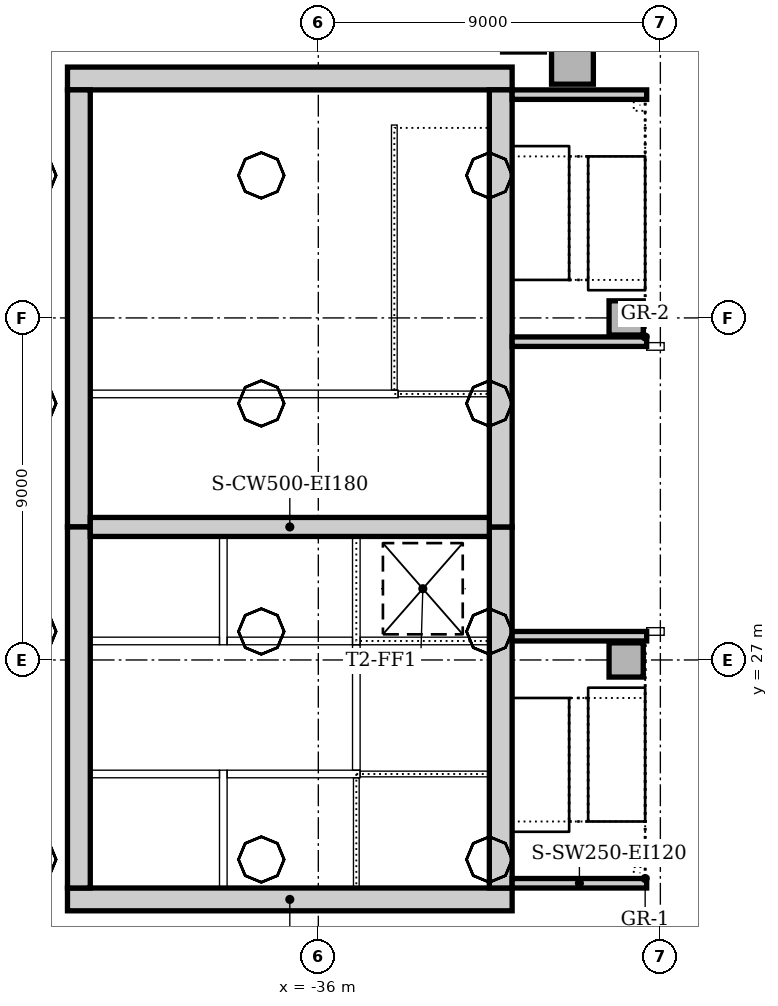
"""IFC4 building model, lengths in metres.
Left out: names, types, materials, properties, quantities, classifications, styles, units other than length and angle.
Written with IfcOpenShell. Run it as: python <this file> out.ifc"""

import sys

from ifc_helpers import new_model, si_unit, direction, frame, frame_2d, origin, origin_2d, place, context, subcontext, project, spatial, rectangle, extrude, element, fill, save


model = new_model("IFC4")
c1 = context("Model", 3, precision=1e-05, world=origin(), true_north=direction((0.0, 1.0)))
c2 = subcontext(c1, "Body", "Model", "MODEL_VIEW")
j1 = project(units=[si_unit("LENGTHUNIT", "METRE"), si_unit("PLANEANGLEUNIT", "RADIAN")], contexts=[c1])
p1 = place(None, origin())
s1 = spatial("IfcSite", under=j1, at=p1, CompositionType="ELEMENT")
p2 = place(p1, origin())
s2 = spatial("IfcBuilding", under=s1, at=p2, CompositionType="ELEMENT")
p3 = place(p2, frame((0.0, 0.0, -14.0)))
s3 = spatial("IfcBuildingStorey", under=s2, at=p3, CompositionType="ELEMENT", Elevation=-14.0)
for number, where, z_axis, x_axis in (
    (1, (-42.6, 20.7, 0.0), (0.0, 0.0, 1.0), (1.0, 0.0, 0.0)),
    (2, (-30.9, 42.3, 0.0), (0.0, 0.0, 1.0), (-1.0, 0.0, 0.0)),
):
    element("IfcWall", number, at=place(p3, frame(where, z_axis=z_axis, x_axis=x_axis)), inside=s3, PredefinedType="SOLIDWALL", context=c2, shape_type="SweptSolid", body=[
        extrude(rectangle(XDim=11.7, YDim=0.6, at=frame_2d((5.85, 0.0))), origin(), (0.0, 0.0, 1.0), 4.5),
    ])
p4 = place(p3, frame((-31.2, 21.0, 0.0), z_axis=(0.0, 0.0, 1.0), x_axis=(0.0, 1.0, 0.0)))
e3 = element("IfcWall", 3, at=p4, inside=s3, PredefinedType="SOLIDWALL", context=c2, shape_type="SweptSolid", body=[
    extrude(rectangle(XDim=9.5, YDim=0.6, at=frame_2d((4.75, 0.0))), origin(), (0.0, 0.0, 1.0), 4.5),
])
p5 = place(p4, frame((5.25, 0.0, 0.0)))
e4 = element("IfcOpeningElement", 4, at=p5, cuts=e3, PredefinedType="OPENING", context=c2, shape_type="SweptSolid", body=[
    extrude(rectangle(XDim=1.0, YDim=2.1, at=frame_2d((0.5, 1.05))), frame((0.0, 0.31, 0.0), z_axis=(0.0, -1.0, 0.0), x_axis=(1.0, 0.0, 0.0)), (0.0, 0.0, 1.0), 0.62),
])
p6 = place(p3, frame((-31.2, 30.5, 0.0), z_axis=(0.0, 0.0, 1.0), x_axis=(0.0, 1.0, 0.0)))
e5 = element("IfcWall", 5, at=p6, inside=s3, PredefinedType="SOLIDWALL", context=c2, shape_type="SweptSolid", body=[
    extrude(rectangle(XDim=11.5, YDim=0.6, at=frame_2d((5.75, 0.0))), origin(), (0.0, 0.0, 1.0), 4.5),
])
p7 = place(p6, frame((0.85, 0.0, 0.0)))
e6 = element("IfcOpeningElement", 6, at=p7, cuts=e5, PredefinedType="OPENING", context=c2, shape_type="SweptSolid", body=[
    extrude(rectangle(XDim=1.8, YDim=2.1, at=frame_2d((0.9, 1.05))), frame((0.0, 0.31, 0.0), z_axis=(0.0, -1.0, 0.0), x_axis=(1.0, 0.0, 0.0)), (0.0, 0.0, 1.0), 0.62),
])
p8 = place(p3, frame((-42.3, 42.0, 0.0), z_axis=(0.0, 0.0, 1.0), x_axis=(0.0, -1.0, 0.0)))
e7 = element("IfcWall", 7, at=p8, inside=s3, PredefinedType="SOLIDWALL", context=c2, shape_type="SweptSolid", body=[
    extrude(rectangle(XDim=11.5, YDim=0.6, at=frame_2d((5.75, 0.0))), origin(), (0.0, 0.0, 1.0), 4.5),
])
p9 = place(p8, frame((8.85, 0.0, 0.0)))
e8 = element("IfcOpeningElement", 8, at=p9, cuts=e7, PredefinedType="OPENING", context=c2, shape_type="SweptSolid", body=[
    extrude(rectangle(XDim=1.8, YDim=2.1, at=frame_2d((0.9, 1.05))), frame((0.0, 0.31, 0.0), z_axis=(0.0, -1.0, 0.0), x_axis=(1.0, 0.0, 0.0)), (0.0, 0.0, 1.0), 0.62),
])
p10 = place(p3, frame((-42.3, 30.5, 0.0), z_axis=(0.0, 0.0, 1.0), x_axis=(0.0, -1.0, 0.0)))
e9 = element("IfcWall", 9, at=p10, inside=s3, PredefinedType="SOLIDWALL", context=c2, shape_type="SweptSolid", body=[
    extrude(rectangle(XDim=9.5, YDim=0.6, at=frame_2d((4.75, 0.0))), origin(), (0.0, 0.0, 1.0), 4.5),
])
p11 = place(p3, frame((-42.0, 30.5, 0.0), z_axis=(0.0, 0.0, 1.0), x_axis=(1.0, 0.0, 0.0)))
e10 = element("IfcWall", 10, at=p11, inside=s3, PredefinedType="SOLIDWALL", context=c2, shape_type="SweptSolid", body=[
    extrude(rectangle(XDim=10.5, YDim=0.5, at=frame_2d((5.25, 0.0))), origin(), (0.0, 0.0, 1.0), 4.5),
])
p12 = place(p3, frame((-30.9, 21.125, 0.0), z_axis=(0.0, 0.0, 1.0), x_axis=(1.0, 0.0, 0.0)))
e11 = element("IfcWall", 11, at=p12, inside=s3, PredefinedType="SOLIDWALL", context=c2, shape_type="SweptSolid", body=[
    extrude(rectangle(XDim=3.54, YDim=0.25, at=frame_2d((1.77, 0.0))), origin(), (0.0, 0.0, 1.0), 4.5),
])
p13 = place(p3, frame((-27.36, 27.625, 0.0), z_axis=(0.0, 0.0, 1.0), x_axis=(-1.0, 0.0, 0.0)))
e12 = element("IfcWall", 12, at=p13, inside=s3, PredefinedType="SOLIDWALL", context=c2, shape_type="SweptSolid", body=[
    extrude(rectangle(XDim=3.54, YDim=0.25, at=frame_2d((1.77, 0.0))), origin(), (0.0, 0.0, 1.0), 4.5),
])
p14 = place(p13, frame((1.69, 0.0, 0.0)))
e13 = element("IfcOpeningElement", 13, at=p14, cuts=e12, PredefinedType="OPENING", context=c2, shape_type="SweptSolid", body=[
    extrude(rectangle(XDim=1.1, YDim=2.1, at=frame_2d((0.55, 1.05))), frame((0.0, 0.135, 0.0), z_axis=(0.0, -1.0, 0.0), x_axis=(1.0, 0.0, 0.0)), (0.0, 0.0, 1.0), 0.27),
])
p15 = place(p3, frame((-30.9, 35.375, 0.0), z_axis=(0.0, 0.0, 1.0), x_axis=(1.0, 0.0, 0.0)))
e14 = element("IfcWall", 14, at=p15, inside=s3, PredefinedType="SOLIDWALL", context=c2, shape_type="SweptSolid", body=[
    extrude(rectangle(XDim=3.54, YDim=0.25, at=frame_2d((1.77, 0.0))), origin(), (0.0, 0.0, 1.0), 4.5),
])
p16 = place(p15, frame((0.75, 0.0, 0.0)))
e15 = element("IfcOpeningElement", 15, at=p16, cuts=e14, PredefinedType="OPENING", context=c2, shape_type="SweptSolid", body=[
    extrude(rectangle(XDim=1.1, YDim=2.1, at=frame_2d((0.55, 1.05))), frame((0.0, 0.135, 0.0), z_axis=(0.0, -1.0, 0.0), x_axis=(1.0, 0.0, 0.0)), (0.0, 0.0, 1.0), 0.27),
])
p17 = place(p3, frame((-27.36, 41.875, 0.0), z_axis=(0.0, 0.0, 1.0), x_axis=(-1.0, 0.0, 0.0)))
e16 = element("IfcWall", 16, at=p17, inside=s3, PredefinedType="SOLIDWALL", context=c2, shape_type="SweptSolid", body=[
    extrude(rectangle(XDim=3.54, YDim=0.25, at=frame_2d((1.77, 0.0))), origin(), (0.0, 0.0, 1.0), 4.5),
])
for number, where, z_axis, x_axis in (
    (17, (-29.313, 42.7, 0.0), (0.0, 0.0, 1.0), (1.0, 0.0, 0.0)),
    (18, (-30.602, 43.547, 0.0), (0.0, 0.0, 1.0), (1.0, 0.0, 0.0)),
):
    element("IfcColumn", number, at=place(p3, frame(where, z_axis=z_axis, x_axis=x_axis)), inside=s3, PredefinedType="COLUMN", context=c2, shape_type="SweptSolid", body=[
        extrude(rectangle(XDim=1.1, YDim=1.1, at=origin_2d()), origin(), (0.0, 0.0, 1.0), 4.15),
    ])
for number, where, z_axis, x_axis in (
    (19, (-27.9, 27.0, 0.0), (0.0, 0.0, 1.0), (1.0, 0.0, 0.0)),
    (20, (-27.9, 36.0, 0.0), (0.0, 0.0, 1.0), (1.0, 0.0, 0.0)),
):
    element("IfcColumn", number, at=place(p3, frame(where, z_axis=z_axis, x_axis=x_axis)), inside=s3, PredefinedType="COLUMN", context=c2, shape_type="SweptSolid", body=[
        extrude(rectangle(XDim=0.9, YDim=0.9, at=origin_2d()), origin(), (0.0, 0.0, 1.0), 4.5),
    ])
p18 = place(p3, frame((-38.5, 21.0, 0.0), z_axis=(0.0, 0.0, 1.0), x_axis=(0.0, 1.0, 0.0)))
e21 = element("IfcWall", 21, at=p18, inside=s3, PredefinedType="SOLIDWALL", context=c2, shape_type="SweptSolid", body=[
    extrude(rectangle(XDim=3.1, YDim=0.2, at=frame_2d((1.55, 0.0))), origin(), (0.0, 0.0, 1.0), 4.5),
])
p19 = place(p3, frame((-38.6, 24.0, 0.0), z_axis=(0.0, 0.0, 1.0), x_axis=(-1.0, 0.0, 0.0)))
e22 = element("IfcWall", 22, at=p19, inside=s3, PredefinedType="SOLIDWALL", context=c2, shape_type="SweptSolid", body=[
    extrude(rectangle(XDim=3.4, YDim=0.2, at=frame_2d((1.7, 0.0))), origin(), (0.0, 0.0, 1.0), 4.5),
])
p20 = place(p3, frame((-34.9, 24.0, 0.0), z_axis=(0.0, 0.0, 1.0), x_axis=(-1.0, 0.0, 0.0)))
e23 = element("IfcWall", 23, at=p20, inside=s3, PredefinedType="SOLIDWALL", context=c2, shape_type="SweptSolid", body=[
    extrude(rectangle(XDim=3.5, YDim=0.2, at=frame_2d((1.75, 0.0))), origin(), (0.0, 0.0, 1.0), 4.5),
])
p21 = place(p3, frame((-38.5, 27.4, 0.0), z_axis=(0.0, 0.0, 1.0), x_axis=(0.0, 1.0, 0.0)))
e24 = element("IfcWall", 24, at=p21, inside=s3, PredefinedType="SOLIDWALL", context=c2, shape_type="SweptSolid", body=[
    extrude(rectangle(XDim=2.85, YDim=0.2, at=frame_2d((1.425, 0.0))), origin(), (0.0, 0.0, 1.0), 4.5),
])
p22 = place(p3, frame((-42.0, 27.5, 0.0), z_axis=(0.0, 0.0, 1.0), x_axis=(1.0, 0.0, 0.0)))
e25 = element("IfcWall", 25, at=p22, inside=s3, PredefinedType="SOLIDWALL", context=c2, shape_type="SweptSolid", body=[
    extrude(rectangle(XDim=3.4, YDim=0.2, at=frame_2d((1.7, 0.0))), origin(), (0.0, 0.0, 1.0), 4.5),
])
p23 = place(p3, frame((-35.0, 27.4, 0.0), z_axis=(0.0, 0.0, 1.0), x_axis=(0.0, 1.0, 0.0)))
e26 = element("IfcWall", 26, at=p23, inside=s3, PredefinedType="SOLIDWALL", context=c2, shape_type="SweptSolid", body=[
    extrude(rectangle(XDim=2.85, YDim=0.2, at=frame_2d((1.425, 0.0))), origin(), (0.0, 0.0, 1.0), 4.5),
])
p24 = place(p3, frame((-38.4, 27.5, 0.0), z_axis=(0.0, 0.0, 1.0), x_axis=(1.0, 0.0, 0.0)))
e27 = element("IfcWall", 27, at=p24, inside=s3, PredefinedType="SOLIDWALL", context=c2, shape_type="SweptSolid", body=[
    extrude(rectangle(XDim=3.3, YDim=0.2, at=frame_2d((1.65, 0.0))), origin(), (0.0, 0.0, 1.0), 4.5),
])
p25 = place(p3, frame((-34.9, 27.5, 0.0), z_axis=(0.0, 0.0, 1.0), x_axis=(1.0, 0.0, 0.0)))
e28 = element("IfcWall", 28, at=p25, inside=s3, PredefinedType="SOLIDWALL", context=c2, shape_type="SweptSolid", body=[
    extrude(rectangle(XDim=3.4, YDim=0.2, at=frame_2d((1.7, 0.0))), origin(), (0.0, 0.0, 1.0), 4.5),
])
p26 = place(p25, frame((1.1, 0.0, 0.0)))
e29 = element("IfcOpeningElement", 29, at=p26, cuts=e28, PredefinedType="OPENING", context=c2, shape_type="SweptSolid", body=[
    extrude(rectangle(XDim=1.1, YDim=2.1, at=frame_2d((0.55, 1.05))), frame((0.0, 0.11, 0.0), z_axis=(0.0, -1.0, 0.0), x_axis=(1.0, 0.0, 0.0)), (0.0, 0.0, 1.0), 0.22),
])
p27 = place(p3, frame((-35.0, 24.1, 0.0), z_axis=(0.0, 0.0, 1.0), x_axis=(0.0, 1.0, 0.0)))
e30 = element("IfcWall", 30, at=p27, inside=s3, PredefinedType="SOLIDWALL", context=c2, shape_type="SweptSolid", body=[
    extrude(rectangle(XDim=3.3, YDim=0.2, at=frame_2d((1.65, 0.0))), origin(), (0.0, 0.0, 1.0), 4.5),
])
for number, where, z_axis, x_axis in (
    (31, (-27.36, 27.75, 0.0), (0.0, 0.0, 1.0), (1.0, 0.0, 0.0)),
    (32, (-26.9, 35.25, 0.0), (0.0, 0.0, 1.0), (-1.0, 0.0, 0.0)),
):
    element("IfcWall", number, at=place(p3, frame(where, z_axis=z_axis, x_axis=x_axis)), inside=s3, PredefinedType="SOLIDWALL", context=c2, shape_type="SweptSolid", body=[
        extrude(rectangle(XDim=0.46, YDim=0.2, at=frame_2d((0.23, 0.0))), origin(), (0.0, 0.0, 1.0), 4.5),
    ])
p28 = place(p3, frame((-33.9, 34.0, 0.0), z_axis=(0.0, 0.0, 1.0), x_axis=(-1.0, 0.0, 0.0)))
e33 = element("IfcWall", 33, at=p28, inside=s3, PredefinedType="SOLIDWALL", context=c2, shape_type="SweptSolid", body=[
    extrude(rectangle(XDim=8.1, YDim=0.2, at=frame_2d((4.05, 0.0))), origin(), (0.0, 0.0, 1.0), 4.5),
])
p29 = place(p3, frame((-35.0, 21.0, 0.0), z_axis=(0.0, 0.0, 1.0), x_axis=(0.0, 1.0, 0.0)))
e34 = element("IfcWall", 34, at=p29, inside=s3, PredefinedType="SOLIDWALL", context=c2, shape_type="SweptSolid", body=[
    extrude(rectangle(XDim=2.9, YDim=0.15, at=frame_2d((1.45, 0.0))), origin(), (0.0, 0.0, 1.0), 4.5),
])
p30 = place(p3, frame((-31.5, 24.0, 0.0), z_axis=(0.0, 0.0, 1.0), x_axis=(-1.0, 0.0, 0.0)))
e35 = element("IfcWall", 35, at=p30, inside=s3, PredefinedType="SOLIDWALL", context=c2, shape_type="SweptSolid", body=[
    extrude(rectangle(XDim=3.4, YDim=0.15, at=frame_2d((1.7, 0.0))), origin(), (0.0, 0.0, 1.0), 4.5),
])
p31 = place(p3, frame((-33.9, 34.0, 0.0), z_axis=(0.0, 0.0, 1.0), x_axis=(1.0, 0.0, 0.0)))
e36 = element("IfcWall", 36, at=p31, inside=s3, PredefinedType="SOLIDWALL", context=c2, shape_type="SweptSolid", body=[
    extrude(rectangle(XDim=2.4, YDim=0.15, at=frame_2d((1.2, 0.0))), origin(), (0.0, 0.0, 1.0), 4.5),
])
p32 = place(p3, frame((-34.0, 41.075, 0.0), z_axis=(0.0, 0.0, 1.0), x_axis=(0.0, -1.0, 0.0)))
e37 = element("IfcWall", 37, at=p32, inside=s3, PredefinedType="SOLIDWALL", context=c2, shape_type="SweptSolid", body=[
    extrude(rectangle(XDim=6.975, YDim=0.15, at=frame_2d((3.487, 0.0))), origin(), (0.0, 0.0, 1.0), 4.5),
])
p33 = place(p26, origin())
e38 = element("IfcDoor", 38, at=p33, inside=s3, OperationType="SLIDING_TO_LEFT", PredefinedType="DOOR", context=c2, shape_type="SweptSolid", body=[
    extrude(rectangle(XDim=1.1, YDim=2.1, at=frame_2d((0.55, 1.05))), frame((0.0, 0.025, 0.0), z_axis=(0.0, -1.0, 0.0), x_axis=(1.0, 0.0, 0.0)), (0.0, 0.0, 1.0), 0.05),
])
fill(e29, e38)
p34 = place(p5, frame((1.0, 0.0, 0.0), z_axis=(0.0, 0.0, 1.0), x_axis=(-1.0, 0.0, 0.0)))
e39 = element("IfcDoor", 39, at=p34, inside=s3, OperationType="SINGLE_SWING_LEFT", PredefinedType="DOOR", context=c2, shape_type="SweptSolid", body=[
    extrude(rectangle(XDim=1.0, YDim=2.1, at=frame_2d((0.5, 1.05))), frame((0.0, 0.025, 0.0), z_axis=(0.0, -1.0, 0.0), x_axis=(1.0, 0.0, 0.0)), (0.0, 0.0, 1.0), 0.05),
])
fill(e4, e39)
p35 = place(p14, origin())
e40 = element("IfcDoor", 40, at=p35, inside=s3, OperationType="SINGLE_SWING_RIGHT", PredefinedType="DOOR", context=c2, shape_type="SweptSolid", body=[
    extrude(rectangle(XDim=1.1, YDim=2.1, at=frame_2d((0.55, 1.05))), frame((0.0, 0.025, 0.0), z_axis=(0.0, -1.0, 0.0), x_axis=(1.0, 0.0, 0.0)), (0.0, 0.0, 1.0), 0.05),
])
fill(e13, e40)
p36 = place(p16, origin())
e41 = element("IfcDoor", 41, at=p36, inside=s3, OperationType="SINGLE_SWING_LEFT", PredefinedType="DOOR", context=c2, shape_type="SweptSolid", body=[
    extrude(rectangle(XDim=1.1, YDim=2.1, at=frame_2d((0.55, 1.05))), frame((0.0, 0.025, 0.0), z_axis=(0.0, -1.0, 0.0), x_axis=(1.0, 0.0, 0.0)), (0.0, 0.0, 1.0), 0.05),
])
fill(e15, e41)
p37 = place(p7, origin())
e42 = element("IfcDoor", 42, at=p37, inside=s3, OperationType="DOUBLE_DOOR_SINGLE_SWING", PredefinedType="DOOR", context=c2, shape_type="SweptSolid", body=[
    extrude(rectangle(XDim=1.8, YDim=2.1, at=frame_2d((0.9, 1.05))), frame((0.0, 0.025, 0.0), z_axis=(0.0, -1.0, 0.0), x_axis=(1.0, 0.0, 0.0)), (0.0, 0.0, 1.0), 0.05),
])
fill(e6, e42)
p38 = place(p9, frame((1.8, 0.0, 0.0), z_axis=(0.0, 0.0, 1.0), x_axis=(-1.0, 0.0, 0.0)))
e43 = element("IfcDoor", 43, at=p38, inside=s3, OperationType="DOUBLE_DOOR_SINGLE_SWING", PredefinedType="DOOR", context=c2, shape_type="SweptSolid", body=[
    extrude(rectangle(XDim=1.8, YDim=2.1, at=frame_2d((0.9, 1.05))), frame((0.0, 0.025, 0.0), z_axis=(0.0, -1.0, 0.0), x_axis=(1.0, 0.0, 0.0)), (0.0, 0.0, 1.0), 0.05),
])
fill(e8, e43)
save(model, sys.argv[1])
